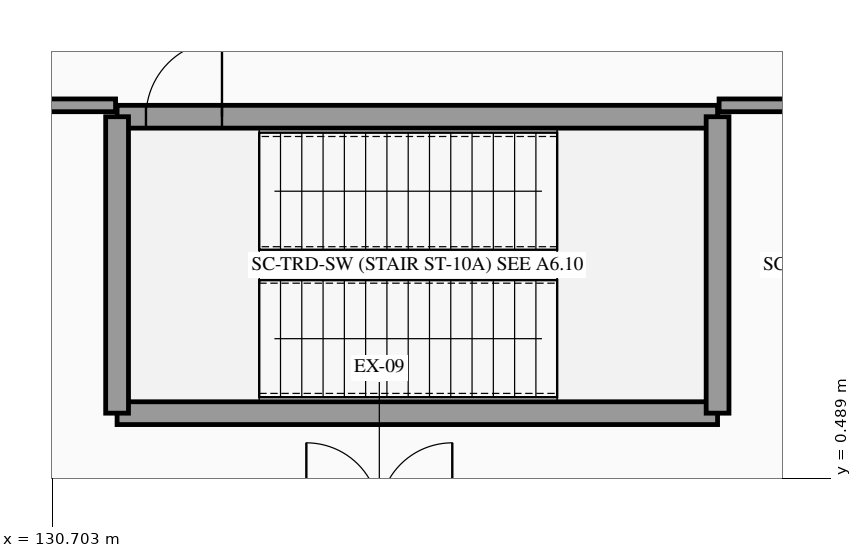
"""IFC4 building model, lengths in metres.
Left out: names, types, materials, properties, quantities, classifications, styles, units other than length and angle.
Written with IfcOpenShell. Run it as: python <this file> out.ifc"""

import sys

from ifc_helpers import new_model, si_unit, direction, frame, frame_2d, origin, place, context, subcontext, project, spatial, rectangle, extrude, element, fill, save


model = new_model("IFC4")
c1 = context("Model", 3, precision=1e-05, world=origin(), true_north=direction((0.0, 1.0)))
c2 = subcontext(c1, "Body", "Model", "MODEL_VIEW")
j1 = project(units=[si_unit("LENGTHUNIT", "METRE"), si_unit("PLANEANGLEUNIT", "RADIAN")], contexts=[c1])
p1 = place(None, origin())
s1 = spatial("IfcSite", under=j1, at=p1, CompositionType="ELEMENT")
p2 = place(p1, origin())
s2 = spatial("IfcBuilding", under=s1, at=p2, CompositionType="ELEMENT")
p3 = place(p2, origin())
s3 = spatial("IfcBuildingStorey", under=s2, at=p3, CompositionType="ELEMENT", Elevation=0.0)
p4 = place(p3, frame((131.55, 1.35, 0.0), z_axis=(0.0, 0.0, 1.0), x_axis=(1.0, 0.0, 0.0)))
e1 = element("IfcWall", 1, at=p4, inside=s3, PredefinedType="SHEAR", context=c2, shape_type="SweptSolid", body=[
    extrude(rectangle(XDim=7.9, YDim=0.3, at=frame_2d((3.95, 0.0))), origin(), (0.0, 0.0, 1.0), 5.4),
])
p5 = place(p3, frame((131.55, 5.25, 0.0), z_axis=(0.0, 0.0, 1.0), x_axis=(1.0, 0.0, 0.0)))
e2 = element("IfcWall", 2, at=p5, inside=s3, PredefinedType="SHEAR", context=c2, shape_type="SweptSolid", body=[
    extrude(rectangle(XDim=7.9, YDim=0.3, at=frame_2d((3.95, 0.0))), origin(), (0.0, 0.0, 1.0), 5.4),
])
p6 = place(p5, frame((0.38, 0.0, 0.0)))
e3 = element("IfcOpeningElement", 3, at=p6, cuts=e2, PredefinedType="OPENING", context=c2, shape_type="SweptSolid", body=[
    extrude(rectangle(XDim=1.0, YDim=2.15, at=frame_2d((0.5, 1.075))), frame((0.0, 0.16, 0.0), z_axis=(0.0, -1.0, 0.0), x_axis=(1.0, 0.0, 0.0)), (0.0, 0.0, 1.0), 0.32),
])
for number, where, z_axis, x_axis in (
    (4, (131.55, 1.35, 0.0), (0.0, 0.0, 1.0), (0.0, 1.0, 0.0)),
    (5, (139.45, 1.35, 0.0), (0.0, 0.0, 1.0), (0.0, 1.0, 0.0)),
):
    element("IfcWall", number, at=place(p3, frame(where, z_axis=z_axis, x_axis=x_axis)), inside=s3, PredefinedType="SHEAR", context=c2, shape_type="SweptSolid", body=[
        extrude(rectangle(XDim=3.9, YDim=0.3, at=frame_2d((1.95, 0.0))), origin(), (0.0, 0.0, 1.0), 5.4),
    ])
p7 = place(p3, frame((129.6, 5.4, 0.0), z_axis=(0.0, 0.0, 1.0), x_axis=(1.0, 0.0, 0.0)))
e6 = element("IfcWall", 6, at=p7, inside=s3, PredefinedType="PARTITIONING", context=c2, shape_type="SweptSolid", body=[
    extrude(rectangle(XDim=1.93, YDim=0.168, at=frame_2d((0.965, 0.0))), origin(), (0.0, 0.0, 1.0), 3.95),
])
p8 = place(p3, frame((139.47, 5.4, 0.0), z_axis=(0.0, 0.0, 1.0), x_axis=(1.0, 0.0, 0.0)))
e7 = element("IfcWall", 7, at=p8, inside=s3, PredefinedType="PARTITIONING", context=c2, shape_type="SweptSolid", body=[
    extrude(rectangle(XDim=1.86, YDim=0.168, at=frame_2d((0.93, 0.0))), origin(), (0.0, 0.0, 1.0), 3.95),
])
p9 = place(p6, frame((1.0, 0.0, 0.0), z_axis=(0.0, 0.0, 1.0), x_axis=(-1.0, 0.0, 0.0)))
e8 = element("IfcDoor", 8, at=p9, inside=s3, OperationType="SINGLE_SWING_RIGHT", PredefinedType="DOOR", context=c2, shape_type="SweptSolid", body=[
    extrude(rectangle(XDim=1.0, YDim=2.15, at=frame_2d((0.5, 1.075))), frame((0.0, 0.025, 0.0), z_axis=(0.0, -1.0, 0.0), x_axis=(1.0, 0.0, 0.0)), (0.0, 0.0, 1.0), 0.05),
])
fill(e3, e8)
save(model, sys.argv[1])
